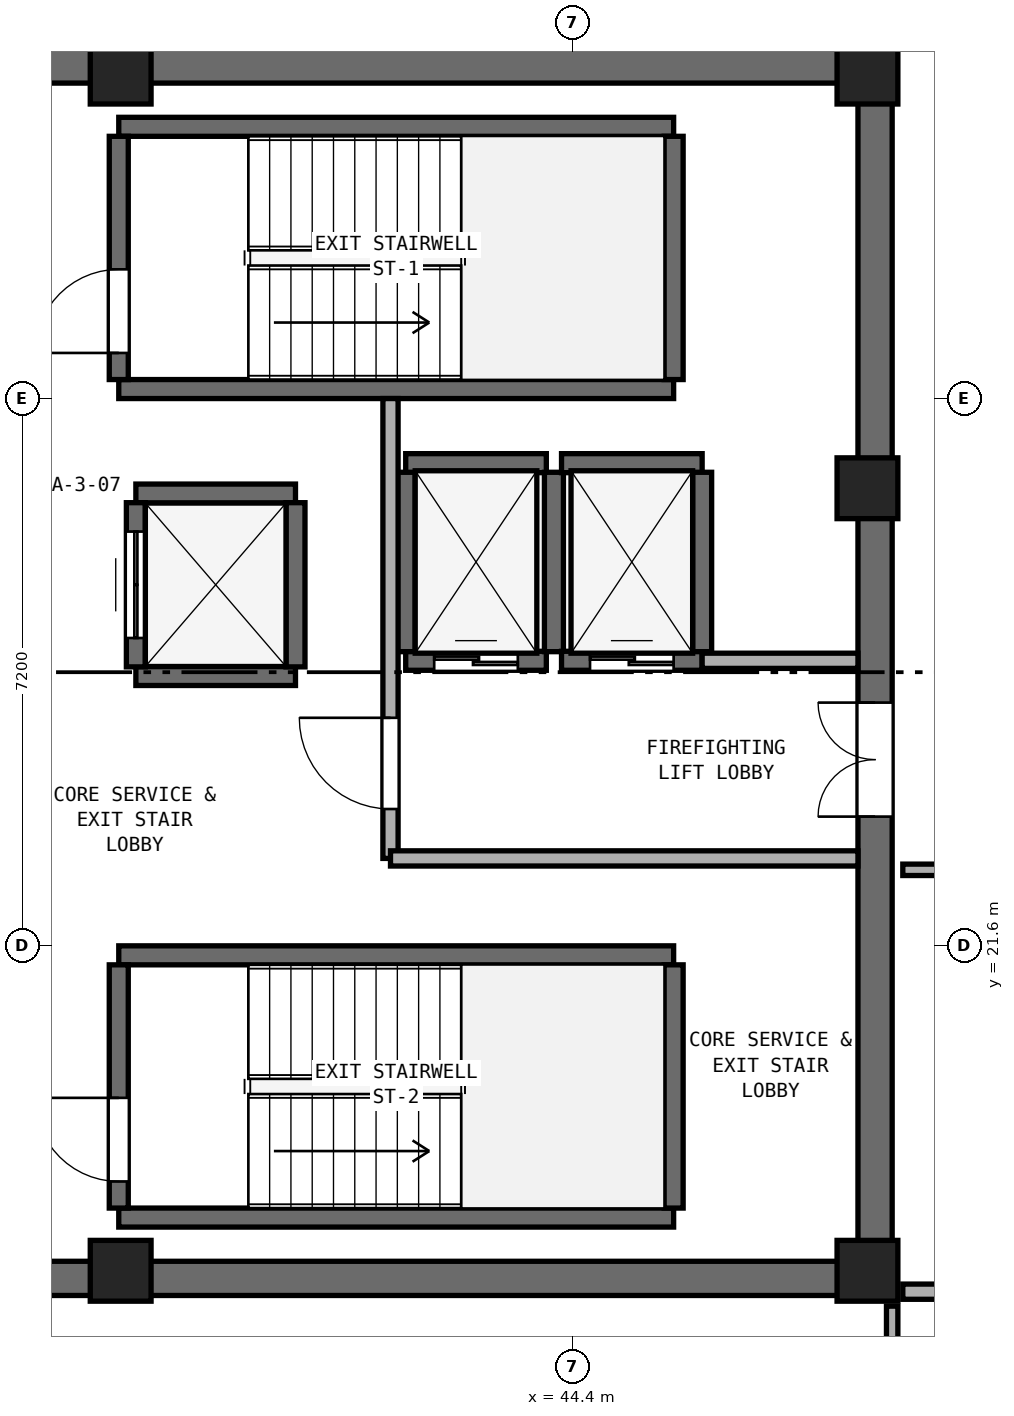
"""IFC4 building model, lengths in metres.
Left out: names, types, materials, properties, quantities, classifications, styles, units other than length and angle.
Written with IfcOpenShell. Run it as: python <this file> out.ifc"""

import sys

from ifc_helpers import new_model, si_unit, direction, frame, frame_2d, origin, origin_2d, place, context, subcontext, project, spatial, rectangle, extrude, element, fill, save


model = new_model("IFC4")
c1 = context("Model", 3, precision=1e-05, world=origin(), true_north=direction((0.0, 1.0)))
c2 = subcontext(c1, "Body", "Model", "MODEL_VIEW")
j1 = project(units=[si_unit("LENGTHUNIT", "METRE"), si_unit("PLANEANGLEUNIT", "RADIAN")], contexts=[c1])
p1 = place(None, origin())
s1 = spatial("IfcSite", under=j1, at=p1, CompositionType="ELEMENT")
p2 = place(p1, origin())
s2 = spatial("IfcBuilding", under=s1, at=p2, CompositionType="ELEMENT")
p3 = place(p2, frame((0.0, 0.0, 270.6)))
s3 = spatial("IfcBuildingStorey", under=s2, at=p3, CompositionType="ELEMENT", Elevation=270.6)
for number, where, z_axis, x_axis in (
    (1, (25.4, 17.225, 0.0), (0.0, 0.0, 1.0), (1.0, 0.0, 0.0)),
    (2, (25.4, 33.175, 0.0), (0.0, 0.0, 1.0), (1.0, 0.0, 0.0)),
):
    element("IfcWall", number, at=place(p3, frame(where, z_axis=z_axis, x_axis=x_axis)), inside=s3, PredefinedType="SHEAR", context=c2, shape_type="SweptSolid", body=[
        extrude(rectangle(XDim=23.2, YDim=0.45, at=frame_2d((11.6, 0.0))), origin(), (0.0, 0.0, 1.0), 3.54),
    ])
p4 = place(p3, frame((48.375, 17.45, 0.0), z_axis=(0.0, 0.0, 1.0), x_axis=(0.0, 1.0, 0.0)))
e3 = element("IfcWall", 3, at=p4, inside=s3, PredefinedType="SHEAR", context=c2, shape_type="SweptSolid", body=[
    extrude(rectangle(XDim=15.5, YDim=0.45, at=frame_2d((7.75, 0.0))), origin(), (0.0, 0.0, 1.0), 3.54),
])
p5 = place(p4, frame((5.85, 0.0, 0.0)))
e4 = element("IfcOpeningElement", 4, at=p5, cuts=e3, PredefinedType="OPENING", context=c2, shape_type="SweptSolid", body=[
    extrude(rectangle(XDim=1.5, YDim=2.15, at=frame_2d((0.75, 1.075))), frame((0.0, 0.235, 0.0), z_axis=(0.0, -1.0, 0.0), x_axis=(1.0, 0.0, 0.0)), (0.0, 0.0, 1.0), 0.47),
])
for number, where, z_axis, x_axis in (
    (5, (38.45, 17.325, 0.0), (0.0, 0.0, 1.0), (1.0, 0.0, 0.0)),
    (6, (48.275, 17.325, 0.0), (0.0, 0.0, 1.0), (1.0, 0.0, 0.0)),
    (7, (48.275, 27.62, 0.0), (0.0, 0.0, 1.0), (1.0, 0.0, 0.0)),
    (8, (48.275, 33.075, 0.0), (0.0, 0.0, 1.0), (1.0, 0.0, 0.0)),
    (9, (38.45, 33.075, 0.0), (0.0, 0.0, 1.0), (1.0, 0.0, 0.0)),
):
    element("IfcColumn", number, at=place(p3, frame(where, z_axis=z_axis, x_axis=x_axis)), inside=s3, PredefinedType="PILASTER", context=c2, shape_type="SweptSolid", body=[
        extrude(rectangle(XDim=0.8, YDim=0.8, at=origin_2d()), origin(), (0.0, 0.0, 1.0), 3.8),
    ])
for number, where, z_axis, x_axis in (
    (10, (38.425, 28.925, 0.0), (0.0, 0.0, 1.0), (1.0, 0.0, 0.0)),
    (11, (38.425, 32.375, 0.0), (0.0, 0.0, 1.0), (1.0, 0.0, 0.0)),
):
    element("IfcWall", number, at=place(p3, frame(where, z_axis=z_axis, x_axis=x_axis)), inside=s3, PredefinedType="SHEAR", context=c2, shape_type="SweptSolid", body=[
        extrude(rectangle(XDim=7.3, YDim=0.25, at=frame_2d((3.65, 0.0))), origin(), (0.0, 0.0, 1.0), 3.54),
    ])
p6 = place(p3, frame((38.425, 29.05, 0.0), z_axis=(0.0, 0.0, 1.0), x_axis=(0.0, 1.0, 0.0)))
e12 = element("IfcWall", 12, at=p6, inside=s3, PredefinedType="SHEAR", context=c2, shape_type="SweptSolid", body=[
    extrude(rectangle(XDim=3.2, YDim=0.25, at=frame_2d((1.6, 0.0))), origin(), (0.0, 0.0, 1.0), 3.54),
])
p7 = place(p6, frame((0.35, 0.0, 0.0)))
e13 = element("IfcOpeningElement", 13, at=p7, cuts=e12, PredefinedType="OPENING", context=c2, shape_type="SweptSolid", body=[
    extrude(rectangle(XDim=1.1, YDim=2.15, at=frame_2d((0.55, 1.075))), frame((0.0, 0.135, 0.0), z_axis=(0.0, -1.0, 0.0), x_axis=(1.0, 0.0, 0.0)), (0.0, 0.0, 1.0), 0.27),
])
p8 = place(p3, frame((45.725, 29.05, 0.0), z_axis=(0.0, 0.0, 1.0), x_axis=(0.0, 1.0, 0.0)))
e14 = element("IfcWall", 14, at=p8, inside=s3, PredefinedType="SHEAR", context=c2, shape_type="SweptSolid", body=[
    extrude(rectangle(XDim=3.2, YDim=0.25, at=frame_2d((1.6, 0.0))), origin(), (0.0, 0.0, 1.0), 3.54),
])
for number, where, z_axis, x_axis in (
    (15, (38.425, 18.025, 0.0), (0.0, 0.0, 1.0), (1.0, 0.0, 0.0)),
    (16, (38.425, 21.475, 0.0), (0.0, 0.0, 1.0), (1.0, 0.0, 0.0)),
):
    element("IfcWall", number, at=place(p3, frame(where, z_axis=z_axis, x_axis=x_axis)), inside=s3, PredefinedType="SHEAR", context=c2, shape_type="SweptSolid", body=[
        extrude(rectangle(XDim=7.3, YDim=0.25, at=frame_2d((3.65, 0.0))), origin(), (0.0, 0.0, 1.0), 3.54),
    ])
p9 = place(p3, frame((38.425, 18.15, 0.0), z_axis=(0.0, 0.0, 1.0), x_axis=(0.0, 1.0, 0.0)))
e17 = element("IfcWall", 17, at=p9, inside=s3, PredefinedType="SHEAR", context=c2, shape_type="SweptSolid", body=[
    extrude(rectangle(XDim=3.2, YDim=0.25, at=frame_2d((1.6, 0.0))), origin(), (0.0, 0.0, 1.0), 3.54),
])
p10 = place(p9, frame((0.35, 0.0, 0.0)))
e18 = element("IfcOpeningElement", 18, at=p10, cuts=e17, PredefinedType="OPENING", context=c2, shape_type="SweptSolid", body=[
    extrude(rectangle(XDim=1.1, YDim=2.15, at=frame_2d((0.55, 1.075))), frame((0.0, 0.135, 0.0), z_axis=(0.0, -1.0, 0.0), x_axis=(1.0, 0.0, 0.0)), (0.0, 0.0, 1.0), 0.27),
])
p11 = place(p3, frame((45.725, 18.15, 0.0), z_axis=(0.0, 0.0, 1.0), x_axis=(0.0, 1.0, 0.0)))
e19 = element("IfcWall", 19, at=p11, inside=s3, PredefinedType="SHEAR", context=c2, shape_type="SweptSolid", body=[
    extrude(rectangle(XDim=3.2, YDim=0.25, at=frame_2d((1.6, 0.0))), origin(), (0.0, 0.0, 1.0), 3.54),
])
p12 = place(p3, frame((42.2, 25.35, 0.0), z_axis=(0.0, 0.0, 1.0), x_axis=(1.0, 0.0, 0.0)))
e20 = element("IfcWall", 20, at=p12, inside=s3, PredefinedType="SHEAR", context=c2, shape_type="SweptSolid", body=[
    extrude(rectangle(XDim=1.85, YDim=0.25, at=frame_2d((0.925, 0.0))), origin(), (0.0, 0.0, 1.0), 3.54),
])
p13 = place(p12, frame((0.375, 0.0, 0.0)))
e21 = element("IfcOpeningElement", 21, at=p13, cuts=e20, PredefinedType="OPENING", context=c2, shape_type="SweptSolid", body=[
    extrude(rectangle(XDim=1.1, YDim=2.15, at=frame_2d((0.55, 1.075))), frame((0.0, 0.135, 0.0), z_axis=(0.0, -1.0, 0.0), x_axis=(1.0, 0.0, 0.0)), (0.0, 0.0, 1.0), 0.27),
])
p14 = place(p3, frame((42.2, 27.95, 0.0), z_axis=(0.0, 0.0, 1.0), x_axis=(1.0, 0.0, 0.0)))
e22 = element("IfcWall", 22, at=p14, inside=s3, PredefinedType="SHEAR", context=c2, shape_type="SweptSolid", body=[
    extrude(rectangle(XDim=1.85, YDim=0.25, at=frame_2d((0.925, 0.0))), origin(), (0.0, 0.0, 1.0), 3.54),
])
for number, where, z_axis, x_axis in (
    (23, (42.2, 25.47, 0.0), (0.0, 0.0, 1.0), (0.0, 1.0, 0.0)),
    (24, (44.15, 25.47, 0.0), (0.0, 0.0, 1.0), (0.0, 1.0, 0.0)),
):
    element("IfcWall", number, at=place(p3, frame(where, z_axis=z_axis, x_axis=x_axis)), inside=s3, PredefinedType="SHEAR", context=c2, shape_type="SweptSolid", body=[
        extrude(rectangle(XDim=2.36, YDim=0.25, at=frame_2d((1.18, 0.0))), origin(), (0.0, 0.0, 1.0), 3.54),
    ])
p15 = place(p3, frame((44.25, 25.35, 0.0), z_axis=(0.0, 0.0, 1.0), x_axis=(1.0, 0.0, 0.0)))
e25 = element("IfcWall", 25, at=p15, inside=s3, PredefinedType="SHEAR", context=c2, shape_type="SweptSolid", body=[
    extrude(rectangle(XDim=1.85, YDim=0.25, at=frame_2d((0.925, 0.0))), origin(), (0.0, 0.0, 1.0), 3.54),
])
p16 = place(p15, frame((0.375, 0.0, 0.0)))
e26 = element("IfcOpeningElement", 26, at=p16, cuts=e25, PredefinedType="OPENING", context=c2, shape_type="SweptSolid", body=[
    extrude(rectangle(XDim=1.1, YDim=2.15, at=frame_2d((0.55, 1.075))), frame((0.0, 0.135, 0.0), z_axis=(0.0, -1.0, 0.0), x_axis=(1.0, 0.0, 0.0)), (0.0, 0.0, 1.0), 0.27),
])
p17 = place(p3, frame((44.25, 27.95, 0.0), z_axis=(0.0, 0.0, 1.0), x_axis=(1.0, 0.0, 0.0)))
e27 = element("IfcWall", 27, at=p17, inside=s3, PredefinedType="SHEAR", context=c2, shape_type="SweptSolid", body=[
    extrude(rectangle(XDim=1.85, YDim=0.25, at=frame_2d((0.925, 0.0))), origin(), (0.0, 0.0, 1.0), 3.54),
])
p18 = place(p3, frame((46.1, 25.47, 0.0), z_axis=(0.0, 0.0, 1.0), x_axis=(0.0, 1.0, 0.0)))
e28 = element("IfcWall", 28, at=p18, inside=s3, PredefinedType="SHEAR", context=c2, shape_type="SweptSolid", body=[
    extrude(rectangle(XDim=2.36, YDim=0.25, at=frame_2d((1.18, 0.0))), origin(), (0.0, 0.0, 1.0), 3.54),
])
for number, where, z_axis, x_axis in (
    (29, (38.65, 25.15, 0.0), (0.0, 0.0, 1.0), (1.0, 0.0, 0.0)),
    (30, (38.65, 27.55, 0.0), (0.0, 0.0, 1.0), (1.0, 0.0, 0.0)),
):
    element("IfcWall", number, at=place(p3, frame(where, z_axis=z_axis, x_axis=x_axis)), inside=s3, PredefinedType="SHEAR", context=c2, shape_type="SweptSolid", body=[
        extrude(rectangle(XDim=2.1, YDim=0.25, at=frame_2d((1.05, 0.0))), origin(), (0.0, 0.0, 1.0), 3.54),
    ])
p19 = place(p3, frame((38.65, 25.27, 0.0), z_axis=(0.0, 0.0, 1.0), x_axis=(0.0, 1.0, 0.0)))
e31 = element("IfcWall", 31, at=p19, inside=s3, PredefinedType="SHEAR", context=c2, shape_type="SweptSolid", body=[
    extrude(rectangle(XDim=2.16, YDim=0.25, at=frame_2d((1.08, 0.0))), origin(), (0.0, 0.0, 1.0), 3.54),
])
p20 = place(p19, frame((0.38, 0.0, 0.0)))
e32 = element("IfcOpeningElement", 32, at=p20, cuts=e31, PredefinedType="OPENING", context=c2, shape_type="SweptSolid", body=[
    extrude(rectangle(XDim=1.4, YDim=2.2, at=frame_2d((0.7, 1.1))), frame((0.0, 0.135, 0.0), z_axis=(0.0, -1.0, 0.0), x_axis=(1.0, 0.0, 0.0)), (0.0, 0.0, 1.0), 0.27),
])
p21 = place(p3, frame((40.75, 25.27, 0.0), z_axis=(0.0, 0.0, 1.0), x_axis=(0.0, 1.0, 0.0)))
e33 = element("IfcWall", 33, at=p21, inside=s3, PredefinedType="SHEAR", context=c2, shape_type="SweptSolid", body=[
    extrude(rectangle(XDim=2.16, YDim=0.25, at=frame_2d((1.08, 0.0))), origin(), (0.0, 0.0, 1.0), 3.54),
])
p22 = place(p3, frame((42.0, 22.75, 0.0), z_axis=(0.0, 0.0, 1.0), x_axis=(0.0, 1.0, 0.0)))
e34 = element("IfcWall", 34, at=p22, inside=s3, PredefinedType="SOLIDWALL", context=c2, shape_type="SweptSolid", body=[
    extrude(rectangle(XDim=6.05, YDim=0.2, at=frame_2d((3.025, 0.0))), origin(), (0.0, 0.0, 1.0), 3.54),
])
p23 = place(p22, frame((0.65, 0.0, 0.0)))
e35 = element("IfcOpeningElement", 35, at=p23, cuts=e34, PredefinedType="OPENING", context=c2, shape_type="SweptSolid", body=[
    extrude(rectangle(XDim=1.2, YDim=2.15, at=frame_2d((0.6, 1.075))), frame((0.0, 0.11, 0.0), z_axis=(0.0, -1.0, 0.0), x_axis=(1.0, 0.0, 0.0)), (0.0, 0.0, 1.0), 0.22),
])
p24 = place(p3, frame((42.0, 22.75, 0.0), z_axis=(0.0, 0.0, 1.0), x_axis=(1.0, 0.0, 0.0)))
e36 = element("IfcWall", 36, at=p24, inside=s3, PredefinedType="SOLIDWALL", context=c2, shape_type="SweptSolid", body=[
    extrude(rectangle(XDim=6.15, YDim=0.2, at=frame_2d((3.075, 0.0))), origin(), (0.0, 0.0, 1.0), 3.54),
])
p25 = place(p3, frame((46.1, 25.35, 0.0), z_axis=(0.0, 0.0, 1.0), x_axis=(1.0, 0.0, 0.0)))
e37 = element("IfcWall", 37, at=p25, inside=s3, PredefinedType="SOLIDWALL", context=c2, shape_type="SweptSolid", body=[
    extrude(rectangle(XDim=2.05, YDim=0.2, at=frame_2d((1.025, 0.0))), origin(), (0.0, 0.0, 1.0), 3.54),
])
p26 = place(p3, frame((48.6, 14.85, 0.0), z_axis=(0.0, 0.0, 1.0), x_axis=(0.0, 1.0, 0.0)))
e38 = element("IfcWall", 38, at=p26, inside=s3, PredefinedType="PARTITIONING", context=c2, shape_type="SweptSolid", body=[
    extrude(rectangle(XDim=2.01, YDim=0.15, at=frame_2d((1.005, 0.0))), origin(), (0.0, 0.0, 1.0), 2.19),
])
p27 = place(p3, frame((48.74, 17.05, 0.0), z_axis=(0.0, 0.0, 1.0), x_axis=(1.0, 0.0, 0.0)))
e39 = element("IfcWall", 39, at=p27, inside=s3, PredefinedType="PARTITIONING", context=c2, shape_type="SweptSolid", body=[
    extrude(rectangle(XDim=16.555, YDim=0.2, at=frame_2d((8.277, 0.0))), origin(), (0.0, 0.0, 1.0), 2.19),
])
p28 = place(p3, frame((48.74, 22.6, 0.0), z_axis=(0.0, 0.0, 1.0), x_axis=(1.0, 0.0, 0.0)))
e40 = element("IfcWall", 40, at=p28, inside=s3, PredefinedType="PARTITIONING", context=c2, shape_type="SweptSolid", body=[
    extrude(rectangle(XDim=2.01, YDim=0.15, at=frame_2d((1.005, 0.0))), origin(), (0.0, 0.0, 1.0), 3.54),
])
p29 = place(p7, origin())
e41 = element("IfcDoor", 41, at=p29, inside=s3, OperationType="SINGLE_SWING_LEFT", PredefinedType="DOOR", context=c2, shape_type="SweptSolid", body=[
    extrude(rectangle(XDim=1.1, YDim=2.15, at=frame_2d((0.55, 1.075))), frame((0.0, 0.025, 0.0), z_axis=(0.0, -1.0, 0.0), x_axis=(1.0, 0.0, 0.0)), (0.0, 0.0, 1.0), 0.05),
])
fill(e13, e41)
p30 = place(p10, origin())
e42 = element("IfcDoor", 42, at=p30, inside=s3, OperationType="SINGLE_SWING_RIGHT", PredefinedType="DOOR", context=c2, shape_type="SweptSolid", body=[
    extrude(rectangle(XDim=1.1, YDim=2.15, at=frame_2d((0.55, 1.075))), frame((0.0, 0.025, 0.0), z_axis=(0.0, -1.0, 0.0), x_axis=(1.0, 0.0, 0.0)), (0.0, 0.0, 1.0), 0.05),
])
fill(e18, e42)
p31 = place(p13, origin())
e43 = element("IfcDoor", 43, at=p31, inside=s3, OperationType="DOUBLE_DOOR_SLIDING", PredefinedType="DOOR", context=c2, shape_type="SweptSolid", body=[
    extrude(rectangle(XDim=1.1, YDim=2.15, at=frame_2d((0.55, 1.075))), frame((0.0, 0.025, 0.0), z_axis=(0.0, -1.0, 0.0), x_axis=(1.0, 0.0, 0.0)), (0.0, 0.0, 1.0), 0.05),
])
fill(e21, e43)
p32 = place(p16, origin())
e44 = element("IfcDoor", 44, at=p32, inside=s3, OperationType="DOUBLE_DOOR_SLIDING", PredefinedType="DOOR", context=c2, shape_type="SweptSolid", body=[
    extrude(rectangle(XDim=1.1, YDim=2.15, at=frame_2d((0.55, 1.075))), frame((0.0, 0.025, 0.0), z_axis=(0.0, -1.0, 0.0), x_axis=(1.0, 0.0, 0.0)), (0.0, 0.0, 1.0), 0.05),
])
fill(e26, e44)
p33 = place(p20, origin())
e45 = element("IfcDoor", 45, at=p33, inside=s3, OperationType="DOUBLE_DOOR_SLIDING", PredefinedType="DOOR", context=c2, shape_type="SweptSolid", body=[
    extrude(rectangle(XDim=1.4, YDim=2.2, at=frame_2d((0.7, 1.1))), frame((0.0, 0.025, 0.0), z_axis=(0.0, -1.0, 0.0), x_axis=(1.0, 0.0, 0.0)), (0.0, 0.0, 1.0), 0.05),
])
fill(e32, e45)
p34 = place(p23, origin())
e46 = element("IfcDoor", 46, at=p34, inside=s3, OperationType="SINGLE_SWING_RIGHT", PredefinedType="DOOR", context=c2, shape_type="SweptSolid", body=[
    extrude(rectangle(XDim=1.2, YDim=2.15, at=frame_2d((0.6, 1.075))), frame((0.0, 0.025, 0.0), z_axis=(0.0, -1.0, 0.0), x_axis=(1.0, 0.0, 0.0)), (0.0, 0.0, 1.0), 0.05),
])
fill(e35, e46)
p35 = place(p5, origin())
e47 = element("IfcDoor", 47, at=p35, inside=s3, OperationType="DOUBLE_DOOR_SINGLE_SWING", PredefinedType="DOOR", context=c2, shape_type="SweptSolid", body=[
    extrude(rectangle(XDim=1.5, YDim=2.15, at=frame_2d((0.75, 1.075))), frame((0.0, 0.025, 0.0), z_axis=(0.0, -1.0, 0.0), x_axis=(1.0, 0.0, 0.0)), (0.0, 0.0, 1.0), 0.05),
])
fill(e4, e47)
save(model, sys.argv[1])
